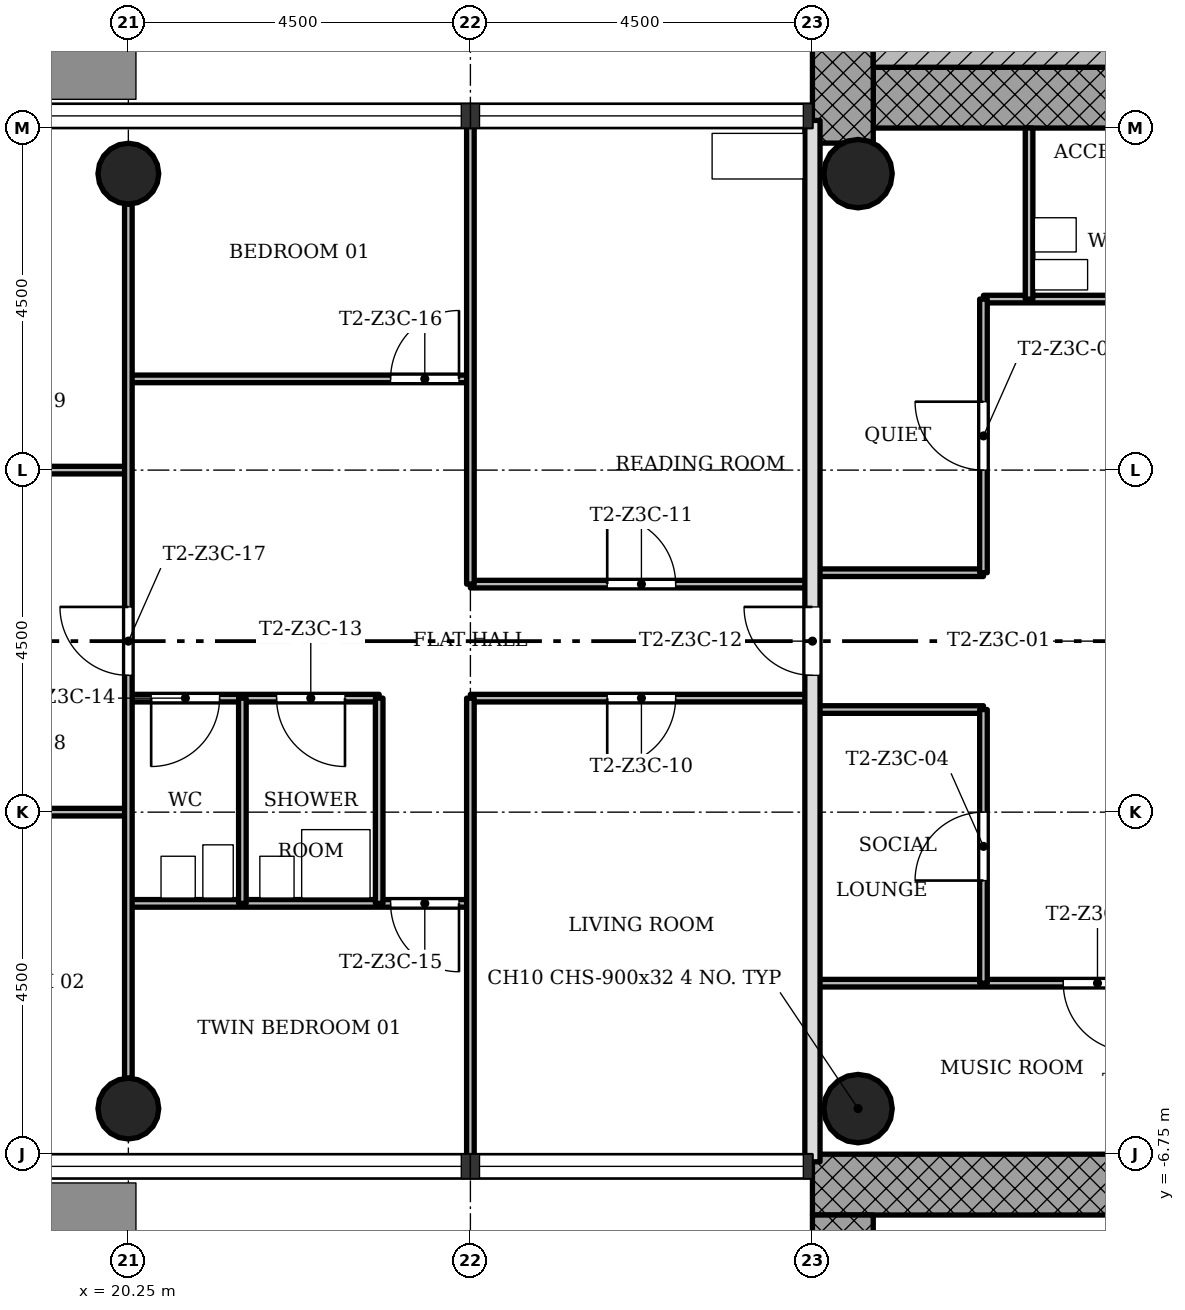
"""IFC4 building model, lengths in metres.
Left out: names, types, materials, properties, quantities, classifications, styles, units other than length and angle.
Written with IfcOpenShell. Run it as: python <this file> out.ifc"""

import sys

from ifc_helpers import new_model, si_unit, direction, frame, frame_2d, origin, origin_2d, place, context, subcontext, project, spatial, rectangle, hollow_circle, extrude, element, fill, save


model = new_model("IFC4")
c1 = context("Model", 3, precision=1e-05, world=origin(), true_north=direction((0.0, 1.0)))
c2 = subcontext(c1, "Body", "Model", "MODEL_VIEW")
j1 = project(units=[si_unit("LENGTHUNIT", "METRE"), si_unit("PLANEANGLEUNIT", "RADIAN")], contexts=[c1])
p1 = place(None, origin())
s1 = spatial("IfcSite", under=j1, at=p1, CompositionType="ELEMENT")
p2 = place(p1, origin())
s2 = spatial("IfcBuilding", under=s1, at=p2, CompositionType="ELEMENT")
p3 = place(p2, frame((0.0, 0.0, 157.5)))
s3 = spatial("IfcBuildingStorey", under=s2, at=p3, CompositionType="ELEMENT", Elevation=157.5)
p4 = place(p3, frame((30.05, 7.15, 0.0), z_axis=(0.0, 0.0, 1.0), x_axis=(1.0, 0.0, 0.0)))
e1 = element("IfcWall", 1, at=p4, inside=s3, PredefinedType="SHEAR", context=c2, shape_type="SweptSolid", body=[
    extrude(rectangle(XDim=12.7, YDim=0.8, at=frame_2d((6.35, 0.0))), origin(), (0.0, 0.0, 1.0), 3.4),
])
p5 = place(p4, frame((5.05, 0.0, 0.0)))
e2 = element("IfcOpeningElement", 2, at=p5, cuts=e1, PredefinedType="OPENING", context=c2, shape_type="SweptSolid", body=[
    extrude(rectangle(XDim=1.8, YDim=2.1, at=frame_2d((0.9, 1.05))), frame((0.0, 0.41, 0.0), z_axis=(0.0, -1.0, 0.0), x_axis=(1.0, 0.0, 0.0)), (0.0, 0.0, 1.0), 0.82),
])
p6 = place(p3, frame((29.65, 15.348, 0.0), z_axis=(0.0, 0.0, 1.0), x_axis=(0.0, -1.0, 0.0)))
e3 = element("IfcWall", 3, at=p6, inside=s3, PredefinedType="SHEAR", context=c2, shape_type="SweptSolid", body=[
    extrude(rectangle(XDim=8.796, YDim=0.8, at=frame_2d((4.398, 0.0))), origin(), (0.0, 0.0, 1.0), 3.4),
])
p7 = place(p3, frame((41.95, -7.15, 0.0), z_axis=(0.0, 0.0, 1.0), x_axis=(-1.0, 0.0, 0.0)))
e4 = element("IfcWall", 4, at=p7, inside=s3, PredefinedType="SHEAR", context=c2, shape_type="SweptSolid", body=[
    extrude(rectangle(XDim=12.7, YDim=0.8, at=frame_2d((6.35, 0.0))), origin(), (0.0, 0.0, 1.0), 3.4),
])
p8 = place(p7, frame((5.05, 0.0, 0.0)))
e5 = element("IfcOpeningElement", 5, at=p8, cuts=e4, PredefinedType="OPENING", context=c2, shape_type="SweptSolid", body=[
    extrude(rectangle(XDim=1.8, YDim=2.1, at=frame_2d((0.9, 1.05))), frame((0.0, 0.41, 0.0), z_axis=(0.0, -1.0, 0.0), x_axis=(1.0, 0.0, 0.0)), (0.0, 0.0, 1.0), 0.82),
])
p9 = place(p3, frame((29.65, -7.55, 0.0), z_axis=(0.0, 0.0, 1.0), x_axis=(0.0, -1.0, 0.0)))
e6 = element("IfcWall", 6, at=p9, inside=s3, PredefinedType="SHEAR", context=c2, shape_type="SweptSolid", body=[
    extrude(rectangle(XDim=8.2, YDim=0.8, at=frame_2d((4.1, 0.0))), origin(), (0.0, 0.0, 1.0), 3.4),
])
for number, where, z_axis, x_axis in (
    (7, (20.25, 6.15, 0.0), (0.0, 0.0, 1.0), (1.0, 0.0, 0.0)),
    (8, (20.25, -6.15, 0.0), (0.0, 0.0, 1.0), (1.0, 0.0, 0.0)),
):
    element("IfcColumn", number, at=place(p3, frame(where, z_axis=z_axis, x_axis=x_axis)), inside=s3, PredefinedType="COLUMN", context=c2, shape_type="SweptSolid", body=[
        extrude(hollow_circle(Radius=0.4, WallThickness=0.028, at=origin_2d()), origin(), (0.0, 0.0, 1.0), 3.4),
    ])
for number, where, z_axis, x_axis in (
    (9, (29.85, 6.15, 0.0), (0.0, 0.0, 1.0), (1.0, 0.0, 0.0)),
    (10, (29.85, -6.15, 0.0), (0.0, 0.0, 1.0), (1.0, 0.0, 0.0)),
):
    element("IfcColumn", number, at=place(p3, frame(where, z_axis=z_axis, x_axis=x_axis)), inside=s3, PredefinedType="COLUMN", context=c2, shape_type="SweptSolid", body=[
        extrude(hollow_circle(Radius=0.45, WallThickness=0.032, at=origin_2d()), origin(), (0.0, 0.0, 1.0), 3.4),
    ])
p10 = place(p3, frame((34.5, -4.5, 0.0), z_axis=(0.0, 0.0, 1.0), x_axis=(-1.0, 0.0, 0.0)))
e11 = element("IfcWall", 11, at=p10, inside=s3, PredefinedType="PARTITIONING", context=c2, shape_type="SweptSolid", body=[
    extrude(rectangle(XDim=5.25, YDim=0.1, at=frame_2d((2.625, 0.0))), origin(), (0.0, 0.0, 1.0), 3.0),
])
p11 = place(p10, frame((1.05, 0.0, 0.0)))
e12 = element("IfcOpeningElement", 12, at=p11, cuts=e11, PredefinedType="OPENING", context=c2, shape_type="SweptSolid", body=[
    extrude(rectangle(XDim=0.9, YDim=2.1, at=frame_2d((0.45, 1.05))), frame((0.0, 0.06, 0.0), z_axis=(0.0, -1.0, 0.0), x_axis=(1.0, 0.0, 0.0)), (0.0, 0.0, 1.0), 0.12),
])
p12 = place(p3, frame((24.75, -3.45, 0.0), z_axis=(0.0, 0.0, 1.0), x_axis=(-1.0, 0.0, 0.0)))
e13 = element("IfcWall", 13, at=p12, inside=s3, PredefinedType="PARTITIONING", context=c2, shape_type="SweptSolid", body=[
    extrude(rectangle(XDim=4.5, YDim=0.1, at=frame_2d((2.25, 0.0))), origin(), (0.0, 0.0, 1.0), 3.0),
])
p13 = place(p12, frame((0.15, 0.0, 0.0)))
e14 = element("IfcOpeningElement", 14, at=p13, cuts=e13, PredefinedType="OPENING", context=c2, shape_type="SweptSolid", body=[
    extrude(rectangle(XDim=0.9, YDim=2.1, at=frame_2d((0.45, 1.05))), frame((0.0, 0.06, 0.0), z_axis=(0.0, -1.0, 0.0), x_axis=(1.0, 0.0, 0.0)), (0.0, 0.0, 1.0), 0.12),
])
p14 = place(p3, frame((20.25, -2.25, 0.0), z_axis=(0.0, 0.0, 1.0), x_axis=(-1.0, 0.0, 0.0)))
e15 = element("IfcWall", 15, at=p14, inside=s3, PredefinedType="PARTITIONING", context=c2, shape_type="SweptSolid", body=[
    extrude(rectangle(XDim=4.6, YDim=0.1, at=frame_2d((2.3, 0.0))), origin(), (0.0, 0.0, 1.0), 3.0),
])
p15 = place(p14, frame((1.05, 0.0, 0.0)))
e16 = element("IfcOpeningElement", 16, at=p15, cuts=e15, PredefinedType="OPENING", context=c2, shape_type="SweptSolid", body=[
    extrude(rectangle(XDim=0.9, YDim=2.1, at=frame_2d((0.45, 1.05))), frame((0.0, 0.06, 0.0), z_axis=(0.0, -1.0, 0.0), x_axis=(1.0, 0.0, 0.0)), (0.0, 0.0, 1.0), 0.12),
])
p16 = place(p3, frame((31.5, -0.9, 0.0), z_axis=(0.0, 0.0, 1.0), x_axis=(-1.0, 0.0, 0.0)))
e17 = element("IfcWall", 17, at=p16, inside=s3, PredefinedType="PARTITIONING", context=c2, shape_type="SweptSolid", body=[
    extrude(rectangle(XDim=2.25, YDim=0.1, at=frame_2d((1.125, 0.0))), origin(), (0.0, 0.0, 1.0), 3.0),
])
p17 = place(p3, frame((29.25, -0.75, 0.0), z_axis=(0.0, 0.0, 1.0), x_axis=(-1.0, 0.0, 0.0)))
e18 = element("IfcWall", 18, at=p17, inside=s3, PredefinedType="PARTITIONING", context=c2, shape_type="SweptSolid", body=[
    extrude(rectangle(XDim=4.5, YDim=0.1, at=frame_2d((2.25, 0.0))), origin(), (0.0, 0.0, 1.0), 3.0),
])
p18 = place(p17, frame((1.8, 0.0, 0.0)))
e19 = element("IfcOpeningElement", 19, at=p18, cuts=e18, PredefinedType="OPENING", context=c2, shape_type="SweptSolid", body=[
    extrude(rectangle(XDim=0.9, YDim=2.1, at=frame_2d((0.45, 1.05))), frame((0.0, 0.06, 0.0), z_axis=(0.0, -1.0, 0.0), x_axis=(1.0, 0.0, 0.0)), (0.0, 0.0, 1.0), 0.12),
])
p19 = place(p3, frame((23.55, -0.75, 0.0), z_axis=(0.0, 0.0, 1.0), x_axis=(-1.0, 0.0, 0.0)))
e20 = element("IfcWall", 20, at=p19, inside=s3, PredefinedType="PARTITIONING", context=c2, shape_type="SweptSolid", body=[
    extrude(rectangle(XDim=3.3, YDim=0.1, at=frame_2d((1.65, 0.0))), origin(), (0.0, 0.0, 1.0), 3.0),
])
p20 = place(p19, frame((0.45, 0.0, 0.0)))
e21 = element("IfcOpeningElement", 21, at=p20, cuts=e20, PredefinedType="OPENING", context=c2, shape_type="SweptSolid", body=[
    extrude(rectangle(XDim=0.9, YDim=2.1, at=frame_2d((0.45, 1.05))), frame((0.0, 0.06, 0.0), z_axis=(0.0, -1.0, 0.0), x_axis=(1.0, 0.0, 0.0)), (0.0, 0.0, 1.0), 0.12),
])
p21 = place(p19, frame((2.1, 0.0, 0.0)))
e22 = element("IfcOpeningElement", 22, at=p21, cuts=e20, PredefinedType="OPENING", context=c2, shape_type="SweptSolid", body=[
    extrude(rectangle(XDim=0.9, YDim=2.1, at=frame_2d((0.45, 1.05))), frame((0.0, 0.06, 0.0), z_axis=(0.0, -1.0, 0.0), x_axis=(1.0, 0.0, 0.0)), (0.0, 0.0, 1.0), 0.12),
])
p22 = place(p3, frame((29.25, 0.75, 0.0), z_axis=(0.0, 0.0, 1.0), x_axis=(-1.0, 0.0, 0.0)))
e23 = element("IfcWall", 23, at=p22, inside=s3, PredefinedType="PARTITIONING", context=c2, shape_type="SweptSolid", body=[
    extrude(rectangle(XDim=4.5, YDim=0.1, at=frame_2d((2.25, 0.0))), origin(), (0.0, 0.0, 1.0), 3.0),
])
p23 = place(p22, frame((1.8, 0.0, 0.0)))
e24 = element("IfcOpeningElement", 24, at=p23, cuts=e23, PredefinedType="OPENING", context=c2, shape_type="SweptSolid", body=[
    extrude(rectangle(XDim=0.9, YDim=2.1, at=frame_2d((0.45, 1.05))), frame((0.0, 0.06, 0.0), z_axis=(0.0, -1.0, 0.0), x_axis=(1.0, 0.0, 0.0)), (0.0, 0.0, 1.0), 0.12),
])
p24 = place(p3, frame((31.5, 0.9, 0.0), z_axis=(0.0, 0.0, 1.0), x_axis=(-1.0, 0.0, 0.0)))
e25 = element("IfcWall", 25, at=p24, inside=s3, PredefinedType="PARTITIONING", context=c2, shape_type="SweptSolid", body=[
    extrude(rectangle(XDim=2.25, YDim=0.1, at=frame_2d((1.125, 0.0))), origin(), (0.0, 0.0, 1.0), 3.0),
])
p25 = place(p3, frame((20.25, 2.25, 0.0), z_axis=(0.0, 0.0, 1.0), x_axis=(-1.0, 0.0, 0.0)))
e26 = element("IfcWall", 26, at=p25, inside=s3, PredefinedType="PARTITIONING", context=c2, shape_type="SweptSolid", body=[
    extrude(rectangle(XDim=4.6, YDim=0.1, at=frame_2d((2.3, 0.0))), origin(), (0.0, 0.0, 1.0), 3.0),
])
p26 = place(p25, frame((1.05, 0.0, 0.0)))
e27 = element("IfcOpeningElement", 27, at=p26, cuts=e26, PredefinedType="OPENING", context=c2, shape_type="SweptSolid", body=[
    extrude(rectangle(XDim=0.9, YDim=2.1, at=frame_2d((0.45, 1.05))), frame((0.0, 0.06, 0.0), z_axis=(0.0, -1.0, 0.0), x_axis=(1.0, 0.0, 0.0)), (0.0, 0.0, 1.0), 0.12),
])
p27 = place(p3, frame((24.75, 3.45, 0.0), z_axis=(0.0, 0.0, 1.0), x_axis=(-1.0, 0.0, 0.0)))
e28 = element("IfcWall", 28, at=p27, inside=s3, PredefinedType="PARTITIONING", context=c2, shape_type="SweptSolid", body=[
    extrude(rectangle(XDim=4.5, YDim=0.1, at=frame_2d((2.25, 0.0))), origin(), (0.0, 0.0, 1.0), 3.0),
])
p28 = place(p27, frame((0.15, 0.0, 0.0)))
e29 = element("IfcOpeningElement", 29, at=p28, cuts=e28, PredefinedType="OPENING", context=c2, shape_type="SweptSolid", body=[
    extrude(rectangle(XDim=0.9, YDim=2.1, at=frame_2d((0.45, 1.05))), frame((0.0, 0.06, 0.0), z_axis=(0.0, -1.0, 0.0), x_axis=(1.0, 0.0, 0.0)), (0.0, 0.0, 1.0), 0.12),
])
p29 = place(p3, frame((34.5, 4.5, 0.0), z_axis=(0.0, 0.0, 1.0), x_axis=(-1.0, 0.0, 0.0)))
e30 = element("IfcWall", 30, at=p29, inside=s3, PredefinedType="PARTITIONING", context=c2, shape_type="SweptSolid", body=[
    extrude(rectangle(XDim=3.0, YDim=0.1, at=frame_2d((1.5, 0.0))), origin(), (0.0, 0.0, 1.0), 3.0),
])
p30 = place(p3, frame((32.1, 4.5, 0.0), z_axis=(0.0, 0.0, 1.0), x_axis=(0.0, 1.0, 0.0)))
e31 = element("IfcWall", 31, at=p30, inside=s3, PredefinedType="PARTITIONING", context=c2, shape_type="SweptSolid", body=[
    extrude(rectangle(XDim=2.25, YDim=0.1, at=frame_2d((1.125, 0.0))), origin(), (0.0, 0.0, 1.0), 3.0),
])
p31 = place(p3, frame((31.5, -4.5, 0.0), z_axis=(0.0, 0.0, 1.0), x_axis=(0.0, 1.0, 0.0)))
e32 = element("IfcWall", 32, at=p31, inside=s3, PredefinedType="PARTITIONING", context=c2, shape_type="SweptSolid", body=[
    extrude(rectangle(XDim=3.6, YDim=0.1, at=frame_2d((1.8, 0.0))), origin(), (0.0, 0.0, 1.0), 3.0),
])
p32 = place(p31, frame((1.35, 0.0, 0.0)))
e33 = element("IfcOpeningElement", 33, at=p32, cuts=e32, PredefinedType="OPENING", context=c2, shape_type="SweptSolid", body=[
    extrude(rectangle(XDim=0.9, YDim=2.1, at=frame_2d((0.45, 1.05))), frame((0.0, 0.06, 0.0), z_axis=(0.0, -1.0, 0.0), x_axis=(1.0, 0.0, 0.0)), (0.0, 0.0, 1.0), 0.12),
])
p33 = place(p3, frame((31.5, 0.9, 0.0), z_axis=(0.0, 0.0, 1.0), x_axis=(0.0, 1.0, 0.0)))
e34 = element("IfcWall", 34, at=p33, inside=s3, PredefinedType="PARTITIONING", context=c2, shape_type="SweptSolid", body=[
    extrude(rectangle(XDim=3.6, YDim=0.1, at=frame_2d((1.8, 0.0))), origin(), (0.0, 0.0, 1.0), 3.0),
])
p34 = place(p33, frame((1.35, 0.0, 0.0)))
e35 = element("IfcOpeningElement", 35, at=p34, cuts=e34, PredefinedType="OPENING", context=c2, shape_type="SweptSolid", body=[
    extrude(rectangle(XDim=0.9, YDim=2.1, at=frame_2d((0.45, 1.05))), frame((0.0, 0.06, 0.0), z_axis=(0.0, -1.0, 0.0), x_axis=(1.0, 0.0, 0.0)), (0.0, 0.0, 1.0), 0.12),
])
p35 = place(p3, frame((29.25, -6.85, 0.0), z_axis=(0.0, 0.0, 1.0), x_axis=(0.0, 1.0, 0.0)))
e36 = element("IfcWall", 36, at=p35, inside=s3, PredefinedType="SOLIDWALL", context=c2, shape_type="SweptSolid", body=[
    extrude(rectangle(XDim=13.7, YDim=0.2, at=frame_2d((6.85, 0.0))), origin(), (0.0, 0.0, 1.0), 3.0),
])
p36 = place(p35, frame((6.4, 0.0, 0.0)))
e37 = element("IfcOpeningElement", 37, at=p36, cuts=e36, PredefinedType="OPENING", context=c2, shape_type="SweptSolid", body=[
    extrude(rectangle(XDim=0.9, YDim=2.1, at=frame_2d((0.45, 1.05))), frame((0.0, 0.11, 0.0), z_axis=(0.0, -1.0, 0.0), x_axis=(1.0, 0.0, 0.0)), (0.0, 0.0, 1.0), 0.22),
])
for number, where, z_axis, x_axis in (
    (38, (24.75, -6.85, 0.0), (0.0, 0.0, 1.0), (0.0, 1.0, 0.0)),
    (39, (24.75, 0.75, 0.0), (0.0, 0.0, 1.0), (0.0, 1.0, 0.0)),
):
    element("IfcWall", number, at=place(p3, frame(where, z_axis=z_axis, x_axis=x_axis)), inside=s3, PredefinedType="PARTITIONING", context=c2, shape_type="SweptSolid", body=[
        extrude(rectangle(XDim=6.1, YDim=0.1, at=frame_2d((3.05, 0.0))), origin(), (0.0, 0.0, 1.0), 3.0),
    ])
for number, where, z_axis, x_axis in (
    (40, (23.55, -3.45, 0.0), (0.0, 0.0, 1.0), (0.0, 1.0, 0.0)),
    (41, (21.75, -3.45, 0.0), (0.0, 0.0, 1.0), (0.0, 1.0, 0.0)),
):
    element("IfcWall", number, at=place(p3, frame(where, z_axis=z_axis, x_axis=x_axis)), inside=s3, PredefinedType="PARTITIONING", context=c2, shape_type="SweptSolid", body=[
        extrude(rectangle(XDim=2.7, YDim=0.1, at=frame_2d((1.35, 0.0))), origin(), (0.0, 0.0, 1.0), 3.0),
    ])
p37 = place(p3, frame((20.25, -5.75, 0.0), z_axis=(0.0, 0.0, 1.0), x_axis=(0.0, 1.0, 0.0)))
e42 = element("IfcWall", 42, at=p37, inside=s3, PredefinedType="PARTITIONING", context=c2, shape_type="SweptSolid", body=[
    extrude(rectangle(XDim=11.5, YDim=0.1, at=frame_2d((5.75, 0.0))), origin(), (0.0, 0.0, 1.0), 3.0),
])
p38 = place(p37, frame((5.3, 0.0, 0.0)))
e43 = element("IfcOpeningElement", 43, at=p38, cuts=e42, PredefinedType="OPENING", context=c2, shape_type="SweptSolid", body=[
    extrude(rectangle(XDim=0.9, YDim=2.1, at=frame_2d((0.45, 1.05))), frame((0.0, 0.06, 0.0), z_axis=(0.0, -1.0, 0.0), x_axis=(1.0, 0.0, 0.0)), (0.0, 0.0, 1.0), 0.12),
])
p39 = place(p3, frame((34.15, 7.75, 0.0), z_axis=(0.0, 0.0, 1.0), x_axis=(-1.0, 0.0, 0.0)))
e44 = element("IfcWall", 44, at=p39, inside=s3, PredefinedType="SHEAR", context=c2, shape_type="SweptSolid", body=[
    extrude(rectangle(XDim=4.1, YDim=0.4, at=frame_2d((2.05, 0.0))), origin(), (0.0, 0.0, 1.0), 3.4),
])
p40 = place(p34, origin())
e45 = element("IfcDoor", 45, at=p40, inside=s3, OperationType="SINGLE_SWING_LEFT", PredefinedType="DOOR", context=c2, shape_type="SweptSolid", body=[
    extrude(rectangle(XDim=0.9, YDim=2.1, at=frame_2d((0.45, 1.05))), frame((0.0, 0.025, 0.0), z_axis=(0.0, -1.0, 0.0), x_axis=(1.0, 0.0, 0.0)), (0.0, 0.0, 1.0), 0.05),
])
fill(e35, e45)
p41 = place(p32, origin())
e46 = element("IfcDoor", 46, at=p41, inside=s3, OperationType="SINGLE_SWING_RIGHT", PredefinedType="DOOR", context=c2, shape_type="SweptSolid", body=[
    extrude(rectangle(XDim=0.9, YDim=2.1, at=frame_2d((0.45, 1.05))), frame((0.0, 0.025, 0.0), z_axis=(0.0, -1.0, 0.0), x_axis=(1.0, 0.0, 0.0)), (0.0, 0.0, 1.0), 0.05),
])
fill(e33, e46)
p42 = place(p11, origin())
e47 = element("IfcDoor", 47, at=p42, inside=s3, OperationType="SINGLE_SWING_RIGHT", PredefinedType="DOOR", context=c2, shape_type="SweptSolid", body=[
    extrude(rectangle(XDim=0.9, YDim=2.1, at=frame_2d((0.45, 1.05))), frame((0.0, 0.025, 0.0), z_axis=(0.0, -1.0, 0.0), x_axis=(1.0, 0.0, 0.0)), (0.0, 0.0, 1.0), 0.05),
])
fill(e12, e47)
p43 = place(p18, origin())
e48 = element("IfcDoor", 48, at=p43, inside=s3, OperationType="SINGLE_SWING_LEFT", PredefinedType="DOOR", context=c2, shape_type="SweptSolid", body=[
    extrude(rectangle(XDim=0.9, YDim=2.1, at=frame_2d((0.45, 1.05))), frame((0.0, 0.025, 0.0), z_axis=(0.0, -1.0, 0.0), x_axis=(1.0, 0.0, 0.0)), (0.0, 0.0, 1.0), 0.05),
])
fill(e19, e48)
p44 = place(p23, origin())
e49 = element("IfcDoor", 49, at=p44, inside=s3, OperationType="SINGLE_SWING_RIGHT", PredefinedType="DOOR", context=c2, shape_type="SweptSolid", body=[
    extrude(rectangle(XDim=0.9, YDim=2.1, at=frame_2d((0.45, 1.05))), frame((0.0, 0.025, 0.0), z_axis=(0.0, -1.0, 0.0), x_axis=(1.0, 0.0, 0.0)), (0.0, 0.0, 1.0), 0.05),
])
fill(e24, e49)
p45 = place(p36, origin())
e50 = element("IfcDoor", 50, at=p45, inside=s3, OperationType="SINGLE_SWING_LEFT", PredefinedType="DOOR", context=c2, shape_type="SweptSolid", body=[
    extrude(rectangle(XDim=0.9, YDim=2.1, at=frame_2d((0.45, 1.05))), frame((0.0, 0.025, 0.0), z_axis=(0.0, -1.0, 0.0), x_axis=(1.0, 0.0, 0.0)), (0.0, 0.0, 1.0), 0.05),
])
fill(e37, e50)
p46 = place(p20, origin())
e51 = element("IfcDoor", 51, at=p46, inside=s3, OperationType="SINGLE_SWING_RIGHT", PredefinedType="DOOR", context=c2, shape_type="SweptSolid", body=[
    extrude(rectangle(XDim=0.9, YDim=2.1, at=frame_2d((0.45, 1.05))), frame((0.0, 0.025, 0.0), z_axis=(0.0, -1.0, 0.0), x_axis=(1.0, 0.0, 0.0)), (0.0, 0.0, 1.0), 0.05),
])
fill(e21, e51)
p47 = place(p21, origin())
e52 = element("IfcDoor", 52, at=p47, inside=s3, OperationType="SINGLE_SWING_LEFT", PredefinedType="DOOR", context=c2, shape_type="SweptSolid", body=[
    extrude(rectangle(XDim=0.9, YDim=2.1, at=frame_2d((0.45, 1.05))), frame((0.0, 0.025, 0.0), z_axis=(0.0, -1.0, 0.0), x_axis=(1.0, 0.0, 0.0)), (0.0, 0.0, 1.0), 0.05),
])
fill(e22, e52)
p48 = place(p13, origin())
e53 = element("IfcDoor", 53, at=p48, inside=s3, OperationType="SINGLE_SWING_RIGHT", PredefinedType="DOOR", context=c2, shape_type="SweptSolid", body=[
    extrude(rectangle(XDim=0.9, YDim=2.1, at=frame_2d((0.45, 1.05))), frame((0.0, 0.025, 0.0), z_axis=(0.0, -1.0, 0.0), x_axis=(1.0, 0.0, 0.0)), (0.0, 0.0, 1.0), 0.05),
])
fill(e14, e53)
p49 = place(p28, origin())
e54 = element("IfcDoor", 54, at=p49, inside=s3, OperationType="SINGLE_SWING_LEFT", PredefinedType="DOOR", context=c2, shape_type="SweptSolid", body=[
    extrude(rectangle(XDim=0.9, YDim=2.1, at=frame_2d((0.45, 1.05))), frame((0.0, 0.025, 0.0), z_axis=(0.0, -1.0, 0.0), x_axis=(1.0, 0.0, 0.0)), (0.0, 0.0, 1.0), 0.05),
])
fill(e29, e54)
p50 = place(p38, origin())
e55 = element("IfcDoor", 55, at=p50, inside=s3, OperationType="SINGLE_SWING_LEFT", PredefinedType="DOOR", context=c2, shape_type="SweptSolid", body=[
    extrude(rectangle(XDim=0.9, YDim=2.1, at=frame_2d((0.45, 1.05))), frame((0.0, 0.025, 0.0), z_axis=(0.0, -1.0, 0.0), x_axis=(1.0, 0.0, 0.0)), (0.0, 0.0, 1.0), 0.05),
])
fill(e43, e55)
save(model, sys.argv[1])
